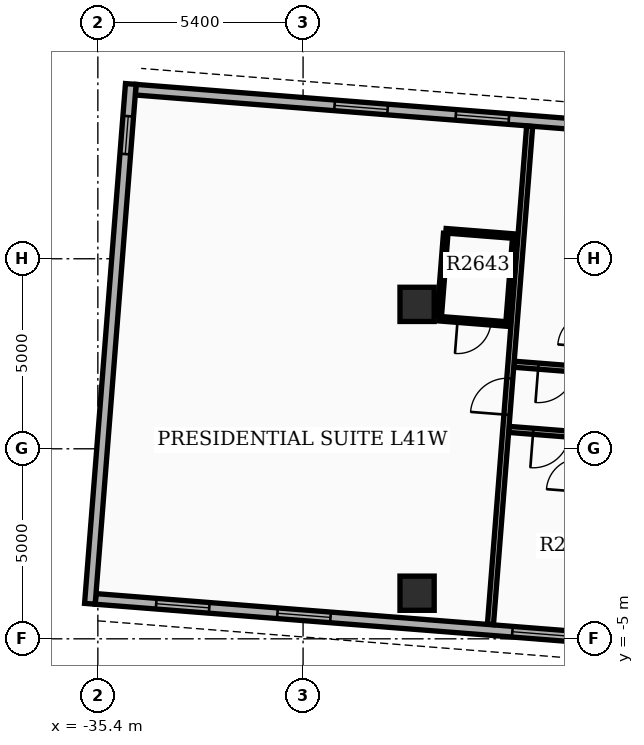
"""IFC4 building model, lengths in metres.
Left out: names, types, materials, properties, quantities, classifications, styles, units other than length and angle.
Written with IfcOpenShell. Run it as: python <this file> out.ifc"""

import sys

from ifc_helpers import new_model, si_unit, direction, frame, frame_2d, origin, origin_2d, place, context, subcontext, project, spatial, rectangle, extrude, element, fill, save


model = new_model("IFC4")
c1 = context("Model", 3, precision=1e-05, world=origin(), true_north=direction((0.0, 1.0)))
c2 = subcontext(c1, "Body", "Model", "MODEL_VIEW")
j1 = project(units=[si_unit("LENGTHUNIT", "METRE"), si_unit("PLANEANGLEUNIT", "RADIAN")], contexts=[c1])
p1 = place(None, origin())
s1 = spatial("IfcSite", under=j1, at=p1, CompositionType="ELEMENT")
p2 = place(p1, origin())
s2 = spatial("IfcBuilding", under=s1, at=p2, CompositionType="ELEMENT")
p3 = place(p2, frame((0.0, 0.0, 164.4)))
s3 = spatial("IfcBuildingStorey", under=s2, at=p3, CompositionType="ELEMENT", Elevation=164.4)
for number, where, z_axis, x_axis in (
    (1, (-27.0, -3.8, 0.0), (0.0, 0.0, 1.0), (1.0, 0.0, 0.0)),
    (2, (-27.0, 3.8, 0.0), (0.0, 0.0, 1.0), (1.0, 0.0, 0.0)),
):
    element("IfcColumn", number, at=place(p3, frame(where, z_axis=z_axis, x_axis=x_axis)), inside=s3, PredefinedType="COLUMN", context=c2, shape_type="SweptSolid", body=[
        extrude(rectangle(XDim=0.9, YDim=0.9, at=origin_2d()), origin(), (0.0, 0.0, 1.0), 3.9),
    ])
p4 = place(p3, frame((-14.367, 7.872, 0.0), z_axis=(0.0, 0.0, 1.0), x_axis=(-0.996917828963, 0.078452802979, 0.0)))
e3 = element("IfcWall", 3, at=p4, inside=s3, PredefinedType="STANDARD", context=c2, shape_type="SweptSolid", body=[
    extrude(rectangle(XDim=20.1, YDim=0.28, at=frame_2d((10.05, 0.0))), origin(), (0.0, 0.0, 1.0), 2.97),
])
p5 = place(p4, frame((1.6, 0.0, 0.8)))
e4 = element("IfcOpeningElement", 4, at=p5, cuts=e3, PredefinedType="OPENING", context=c2, shape_type="SweptSolid", body=[
    extrude(rectangle(XDim=1.4, YDim=1.6, at=frame_2d((0.7, 0.8))), frame((0.0, 0.15, 0.0), z_axis=(0.0, -1.0, 0.0), x_axis=(1.0, 0.0, 0.0)), (0.0, 0.0, 1.0), 0.3),
])
p6 = place(p4, frame((6.55, 0.0, 0.8)))
e5 = element("IfcOpeningElement", 5, at=p6, cuts=e3, PredefinedType="OPENING", context=c2, shape_type="SweptSolid", body=[
    extrude(rectangle(XDim=1.4, YDim=1.6, at=frame_2d((0.7, 0.8))), frame((0.0, 0.15, 0.0), z_axis=(0.0, -1.0, 0.0), x_axis=(1.0, 0.0, 0.0)), (0.0, 0.0, 1.0), 0.3),
])
p7 = place(p4, frame((10.25, 0.0, 0.8)))
e6 = element("IfcOpeningElement", 6, at=p7, cuts=e3, PredefinedType="OPENING", context=c2, shape_type="SweptSolid", body=[
    extrude(rectangle(XDim=1.4, YDim=1.6, at=frame_2d((0.7, 0.8))), frame((0.0, 0.15, 0.0), z_axis=(0.0, -1.0, 0.0), x_axis=(1.0, 0.0, 0.0)), (0.0, 0.0, 1.0), 0.3),
])
p8 = place(p4, frame((13.45, 0.0, 0.8)))
e7 = element("IfcOpeningElement", 7, at=p8, cuts=e3, PredefinedType="OPENING", context=c2, shape_type="SweptSolid", body=[
    extrude(rectangle(XDim=1.4, YDim=1.6, at=frame_2d((0.7, 0.8))), frame((0.0, 0.15, 0.0), z_axis=(0.0, -1.0, 0.0), x_axis=(1.0, 0.0, 0.0)), (0.0, 0.0, 1.0), 0.3),
])
p9 = place(p3, frame((-35.459, -3.95, 0.0), z_axis=(0.0, 0.0, 1.0), x_axis=(0.996917828963, -0.078452802979, 0.0)))
e8 = element("IfcWall", 8, at=p9, inside=s3, PredefinedType="STANDARD", context=c2, shape_type="SweptSolid", body=[
    extrude(rectangle(XDim=20.1, YDim=0.28, at=frame_2d((10.05, 0.0))), origin(), (0.0, 0.0, 1.0), 2.97),
])
p10 = place(p9, frame((1.6, 0.0, 0.8)))
e9 = element("IfcOpeningElement", 9, at=p10, cuts=e8, PredefinedType="OPENING", context=c2, shape_type="SweptSolid", body=[
    extrude(rectangle(XDim=1.4, YDim=1.6, at=frame_2d((0.7, 0.8))), frame((0.0, 0.15, 0.0), z_axis=(0.0, -1.0, 0.0), x_axis=(1.0, 0.0, 0.0)), (0.0, 0.0, 1.0), 0.3),
])
p11 = place(p9, frame((4.8, 0.0, 0.8)))
e10 = element("IfcOpeningElement", 10, at=p11, cuts=e8, PredefinedType="OPENING", context=c2, shape_type="SweptSolid", body=[
    extrude(rectangle(XDim=1.4, YDim=1.6, at=frame_2d((0.7, 0.8))), frame((0.0, 0.15, 0.0), z_axis=(0.0, -1.0, 0.0), x_axis=(1.0, 0.0, 0.0)), (0.0, 0.0, 1.0), 0.3),
])
p12 = place(p9, frame((11.0, 0.0, 0.8)))
e11 = element("IfcOpeningElement", 11, at=p12, cuts=e8, PredefinedType="OPENING", context=c2, shape_type="SweptSolid", body=[
    extrude(rectangle(XDim=1.4, YDim=1.6, at=frame_2d((0.7, 0.8))), frame((0.0, 0.15, 0.0), z_axis=(0.0, -1.0, 0.0), x_axis=(1.0, 0.0, 0.0)), (0.0, 0.0, 1.0), 0.3),
])
p13 = place(p9, frame((14.95, 0.0, 0.8)))
e12 = element("IfcOpeningElement", 12, at=p13, cuts=e8, PredefinedType="OPENING", context=c2, shape_type="SweptSolid", body=[
    extrude(rectangle(XDim=1.4, YDim=1.6, at=frame_2d((0.7, 0.8))), frame((0.0, 0.15, 0.0), z_axis=(0.0, -1.0, 0.0), x_axis=(1.0, 0.0, 0.0)), (0.0, 0.0, 1.0), 0.3),
])
p14 = place(p9, frame((16.8, 0.0, 0.0)))
e13 = element("IfcOpeningElement", 13, at=p14, cuts=e8, PredefinedType="OPENING", context=c2, shape_type="SweptSolid", body=[
    extrude(rectangle(XDim=0.96, YDim=2.1, at=frame_2d((0.48, 1.05))), frame((0.0, 0.15, 0.0), z_axis=(0.0, -1.0, 0.0), x_axis=(1.0, 0.0, 0.0)), (0.0, 0.0, 1.0), 0.3),
])
p15 = place(p3, frame((-34.533, 9.599, 0.0), z_axis=(0.0, 0.0, 1.0), x_axis=(-0.078473519122, -0.996916198482, 0.0)))
e14 = element("IfcWall", 14, at=p15, inside=s3, PredefinedType="STANDARD", context=c2, shape_type="SweptSolid", body=[
    extrude(rectangle(XDim=13.72, YDim=0.28, at=frame_2d((6.86, 0.0))), origin(), (0.0, 0.0, 1.0), 2.97),
])
p16 = place(p15, frame((0.85, 0.0, 0.85)))
e15 = element("IfcOpeningElement", 15, at=p16, cuts=e14, PredefinedType="OPENING", context=c2, shape_type="SweptSolid", body=[
    extrude(rectangle(XDim=1.0, YDim=1.5, at=frame_2d((0.5, 0.75))), frame((0.0, 0.15, 0.0), z_axis=(0.0, -1.0, 0.0), x_axis=(1.0, 0.0, 0.0)), (0.0, 0.0, 1.0), 0.3),
])
p17 = place(p3, frame((-14.781, 1.464, 0.0), z_axis=(0.0, 0.0, 1.0), x_axis=(-0.996917761327, 0.078453662443, 0.0)))
e16 = element("IfcWall", 16, at=p17, inside=s3, PredefinedType="PARTITIONING", context=c2, shape_type="SweptSolid", body=[
    extrude(rectangle(XDim=9.7, YDim=0.16, at=frame_2d((4.85, 0.0))), origin(), (0.0, 0.0, 1.0), 2.96),
])
p18 = place(p17, frame((2.575, 0.0, 0.0)))
e17 = element("IfcOpeningElement", 17, at=p18, cuts=e16, PredefinedType="OPENING", context=c2, shape_type="SweptSolid", body=[
    extrude(rectangle(XDim=0.96, YDim=2.15, at=frame_2d((0.48, 1.075))), frame((0.0, 0.09, 0.0), z_axis=(0.0, -1.0, 0.0), x_axis=(1.0, 0.0, 0.0)), (0.0, 0.0, 1.0), 0.18),
])
p19 = place(p17, frame((8.097, 0.0, 0.0)))
e18 = element("IfcOpeningElement", 18, at=p19, cuts=e16, PredefinedType="OPENING", context=c2, shape_type="SweptSolid", body=[
    extrude(rectangle(XDim=0.96, YDim=2.15, at=frame_2d((0.48, 1.075))), frame((0.0, 0.09, 0.0), z_axis=(0.0, -1.0, 0.0), x_axis=(1.0, 0.0, 0.0)), (0.0, 0.0, 1.0), 0.18),
])
p20 = place(p3, frame((-14.916, -0.25, 0.0), z_axis=(0.0, 0.0, 1.0), x_axis=(-0.99691791624, 0.078451693931, 0.0)))
e19 = element("IfcWall", 19, at=p20, inside=s3, PredefinedType="PARTITIONING", context=c2, shape_type="SweptSolid", body=[
    extrude(rectangle(XDim=9.7, YDim=0.16, at=frame_2d((4.85, 0.0))), origin(), (0.0, 0.0, 1.0), 2.96),
])
p21 = place(p20, frame((2.575, 0.0, 0.0)))
e20 = element("IfcOpeningElement", 20, at=p21, cuts=e19, PredefinedType="OPENING", context=c2, shape_type="SweptSolid", body=[
    extrude(rectangle(XDim=0.96, YDim=2.15, at=frame_2d((0.48, 1.075))), frame((0.0, 0.09, 0.0), z_axis=(0.0, -1.0, 0.0), x_axis=(1.0, 0.0, 0.0)), (0.0, 0.0, 1.0), 0.18),
])
p22 = place(p20, frame((8.097, 0.0, 0.0)))
e21 = element("IfcOpeningElement", 21, at=p22, cuts=e19, PredefinedType="OPENING", context=c2, shape_type="SweptSolid", body=[
    extrude(rectangle(XDim=0.96, YDim=2.15, at=frame_2d((0.48, 1.075))), frame((0.0, 0.09, 0.0), z_axis=(0.0, -1.0, 0.0), x_axis=(1.0, 0.0, 0.0)), (0.0, 0.0, 1.0), 0.18),
])
p23 = place(p3, frame((-25.07, -4.619, 0.0), z_axis=(0.0, 0.0, 1.0), x_axis=(0.078457655694, 0.996917447065, 0.0)))
e22 = element("IfcWall", 22, at=p23, inside=s3, PredefinedType="PARTITIONING", context=c2, shape_type="SweptSolid", body=[
    extrude(rectangle(XDim=13.144, YDim=0.16, at=frame_2d((6.572, 0.0))), origin(), (0.0, 0.0, 1.0), 2.96),
])
p24 = place(p23, frame((5.532, 0.0, 0.0)))
e23 = element("IfcOpeningElement", 23, at=p24, cuts=e22, PredefinedType="OPENING", context=c2, shape_type="SweptSolid", body=[
    extrude(rectangle(XDim=0.96, YDim=2.15, at=frame_2d((0.48, 1.075))), frame((0.0, 0.09, 0.0), z_axis=(0.0, -1.0, 0.0), x_axis=(1.0, 0.0, 0.0)), (0.0, 0.0, 1.0), 0.18),
])
p25 = place(p3, frame((-24.603, 3.351, 0.0), z_axis=(0.0, 0.0, 1.0), x_axis=(0.078503326226, 0.99691385173, 0.0)))
e24 = element("IfcWall", 24, at=p25, inside=s3, PredefinedType="PARTITIONING", context=c2, shape_type="SweptSolid", body=[
    extrude(rectangle(XDim=2.18, YDim=0.12, at=frame_2d((1.09, 0.0))), origin(), (0.0, 0.0, 1.0), 2.96),
])
p26 = place(p3, frame((-26.417, 3.493, 0.0), z_axis=(0.0, 0.0, 1.0), x_axis=(0.078392027287, 0.996922609864, 0.0)))
e25 = element("IfcWall", 25, at=p26, inside=s3, PredefinedType="PARTITIONING", context=c2, shape_type="SweptSolid", body=[
    extrude(rectangle(XDim=2.18, YDim=0.12, at=frame_2d((1.09, 0.0))), origin(), (0.0, 0.0, 1.0), 2.96),
])
p27 = place(p3, frame((-24.608, 3.281, 0.0), z_axis=(0.0, 0.0, 1.0), x_axis=(-0.996926885478, 0.078337634704, 0.0)))
e26 = element("IfcWall", 26, at=p27, inside=s3, PredefinedType="PARTITIONING", context=c2, shape_type="SweptSolid", body=[
    extrude(rectangle(XDim=1.82, YDim=0.12, at=frame_2d((0.91, 0.0))), origin(), (0.0, 0.0, 1.0), 2.96),
])
p28 = place(p27, frame((0.45, 0.0, 0.0)))
e27 = element("IfcOpeningElement", 27, at=p28, cuts=e26, PredefinedType="OPENING", context=c2, shape_type="SweptSolid", body=[
    extrude(rectangle(XDim=0.88, YDim=2.1, at=frame_2d((0.44, 1.05))), frame((0.0, 0.07, 0.0), z_axis=(0.0, -1.0, 0.0), x_axis=(1.0, 0.0, 0.0)), (0.0, 0.0, 1.0), 0.14),
])
p29 = place(p3, frame((-24.427, 5.594, 0.0), z_axis=(0.0, 0.0, 1.0), x_axis=(-0.996915574626, 0.078481444107, 0.0)))
e28 = element("IfcWall", 28, at=p29, inside=s3, PredefinedType="PARTITIONING", context=c2, shape_type="SweptSolid", body=[
    extrude(rectangle(XDim=1.82, YDim=0.12, at=frame_2d((0.91, 0.0))), origin(), (0.0, 0.0, 1.0), 2.96),
])
p30 = place(p7, origin())
e29 = element("IfcWindow", 29, at=p30, inside=s3, PartitioningType="SINGLE_PANEL", PredefinedType="WINDOW", context=c2, shape_type="SweptSolid", body=[
    extrude(rectangle(XDim=1.4, YDim=1.6, at=frame_2d((0.7, 0.8))), frame((0.0, 0.03, 0.0), z_axis=(0.0, -1.0, 0.0), x_axis=(1.0, 0.0, 0.0)), (0.0, 0.0, 1.0), 0.06),
])
fill(e6, e29)
p31 = place(p8, origin())
e30 = element("IfcWindow", 30, at=p31, inside=s3, PartitioningType="SINGLE_PANEL", PredefinedType="WINDOW", context=c2, shape_type="SweptSolid", body=[
    extrude(rectangle(XDim=1.4, YDim=1.6, at=frame_2d((0.7, 0.8))), frame((0.0, 0.03, 0.0), z_axis=(0.0, -1.0, 0.0), x_axis=(1.0, 0.0, 0.0)), (0.0, 0.0, 1.0), 0.06),
])
fill(e7, e30)
p32 = place(p10, origin())
e31 = element("IfcWindow", 31, at=p32, inside=s3, PartitioningType="SINGLE_PANEL", PredefinedType="WINDOW", context=c2, shape_type="SweptSolid", body=[
    extrude(rectangle(XDim=1.4, YDim=1.6, at=frame_2d((0.7, 0.8))), frame((0.0, 0.03, 0.0), z_axis=(0.0, -1.0, 0.0), x_axis=(1.0, 0.0, 0.0)), (0.0, 0.0, 1.0), 0.06),
])
fill(e9, e31)
p33 = place(p11, origin())
e32 = element("IfcWindow", 32, at=p33, inside=s3, PartitioningType="SINGLE_PANEL", PredefinedType="WINDOW", context=c2, shape_type="SweptSolid", body=[
    extrude(rectangle(XDim=1.4, YDim=1.6, at=frame_2d((0.7, 0.8))), frame((0.0, 0.03, 0.0), z_axis=(0.0, -1.0, 0.0), x_axis=(1.0, 0.0, 0.0)), (0.0, 0.0, 1.0), 0.06),
])
fill(e10, e32)
p34 = place(p12, origin())
e33 = element("IfcWindow", 33, at=p34, inside=s3, PartitioningType="SINGLE_PANEL", PredefinedType="WINDOW", context=c2, shape_type="SweptSolid", body=[
    extrude(rectangle(XDim=1.4, YDim=1.6, at=frame_2d((0.7, 0.8))), frame((0.0, 0.03, 0.0), z_axis=(0.0, -1.0, 0.0), x_axis=(1.0, 0.0, 0.0)), (0.0, 0.0, 1.0), 0.06),
])
fill(e11, e33)
p35 = place(p16, origin())
e34 = element("IfcWindow", 34, at=p35, inside=s3, PartitioningType="SINGLE_PANEL", PredefinedType="WINDOW", context=c2, shape_type="SweptSolid", body=[
    extrude(rectangle(XDim=1.0, YDim=1.5, at=frame_2d((0.5, 0.75))), frame((0.0, 0.03, 0.0), z_axis=(0.0, -1.0, 0.0), x_axis=(1.0, 0.0, 0.0)), (0.0, 0.0, 1.0), 0.06),
])
fill(e15, e34)
p36 = place(p19, origin())
e35 = element("IfcDoor", 35, at=p36, inside=s3, OperationType="SINGLE_SWING_RIGHT", PredefinedType="DOOR", context=c2, shape_type="SweptSolid", body=[
    extrude(rectangle(XDim=0.96, YDim=2.15, at=frame_2d((0.48, 1.075))), frame((0.0, 0.025, 0.0), z_axis=(0.0, -1.0, 0.0), x_axis=(1.0, 0.0, 0.0)), (0.0, 0.0, 1.0), 0.05),
])
fill(e18, e35)
p37 = place(p22, origin())
e36 = element("IfcDoor", 36, at=p37, inside=s3, OperationType="SINGLE_SWING_RIGHT", PredefinedType="DOOR", context=c2, shape_type="SweptSolid", body=[
    extrude(rectangle(XDim=0.96, YDim=2.15, at=frame_2d((0.48, 1.075))), frame((0.0, 0.025, 0.0), z_axis=(0.0, -1.0, 0.0), x_axis=(1.0, 0.0, 0.0)), (0.0, 0.0, 1.0), 0.05),
])
fill(e21, e36)
p38 = place(p24, origin())
e37 = element("IfcDoor", 37, at=p38, inside=s3, OperationType="SINGLE_SWING_LEFT", PredefinedType="DOOR", context=c2, shape_type="SweptSolid", body=[
    extrude(rectangle(XDim=0.96, YDim=2.15, at=frame_2d((0.48, 1.075))), frame((0.0, 0.025, 0.0), z_axis=(0.0, -1.0, 0.0), x_axis=(1.0, 0.0, 0.0)), (0.0, 0.0, 1.0), 0.05),
])
fill(e23, e37)
p39 = place(p28, origin())
e38 = element("IfcDoor", 38, at=p39, inside=s3, OperationType="SINGLE_SWING_RIGHT", PredefinedType="DOOR", context=c2, shape_type="SweptSolid", body=[
    extrude(rectangle(XDim=0.88, YDim=2.1, at=frame_2d((0.44, 1.05))), frame((0.0, 0.025, 0.0), z_axis=(0.0, -1.0, 0.0), x_axis=(1.0, 0.0, 0.0)), (0.0, 0.0, 1.0), 0.05),
])
fill(e27, e38)
save(model, sys.argv[1])
